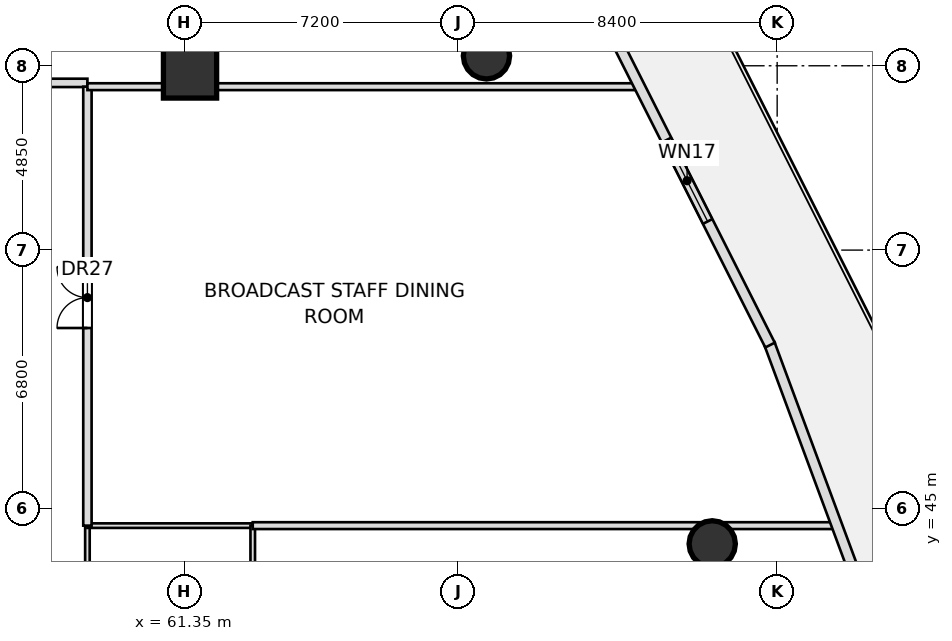
"""IFC4 building model, lengths in metres.
Left out: names, types, materials, properties, quantities, classifications, styles, units other than length and angle.
Written with IfcOpenShell. Run it as: python <this file> out.ifc"""

import sys

from ifc_helpers import new_model, si_unit, direction, frame, frame_2d, origin, origin_2d, place, context, subcontext, project, spatial, rectangle, hollow_circle, extrude, element, fill, save


model = new_model("IFC4")
c1 = context("Model", 3, precision=1e-05, world=origin(), true_north=direction((0.0, 1.0)))
c2 = subcontext(c1, "Body", "Model", "MODEL_VIEW")
j1 = project(units=[si_unit("LENGTHUNIT", "METRE"), si_unit("PLANEANGLEUNIT", "RADIAN")], contexts=[c1])
p1 = place(None, origin())
s1 = spatial("IfcSite", under=j1, at=p1, CompositionType="ELEMENT")
p2 = place(p1, origin())
s2 = spatial("IfcBuilding", under=s1, at=p2, CompositionType="ELEMENT")
p3 = place(p2, frame((0.0, 0.0, 16.8)))
s3 = spatial("IfcBuildingStorey", under=s2, at=p3, CompositionType="ELEMENT", Elevation=16.8)
p4 = place(p3, frame((61.5, 56.5, 0.0), z_axis=(0.0, 0.0, 1.0), x_axis=(1.0, 0.0, 0.0)))
e1 = element("IfcColumn", 1, at=p4, inside=s3, PredefinedType="COLUMN", context=c2, shape_type="SweptSolid", body=[
    extrude(rectangle(XDim=1.4, YDim=1.4, at=origin_2d()), origin(), (0.0, 0.0, 1.0), 4.95),
])
for number, where, z_axis, x_axis in (
    (2, (75.241, 44.07, 0.0), (0.0, 0.0, 1.0), (1.0, 0.0, 0.0)),
    (3, (69.301, 56.911, 0.0), (0.0, 0.0, 1.0), (1.0, 0.0, 0.0)),
):
    element("IfcColumn", number, at=place(p3, frame(where, z_axis=z_axis, x_axis=x_axis)), inside=s3, PredefinedType="COLUMN", context=c2, shape_type="SweptSolid", body=[
        extrude(hollow_circle(Radius=0.61, WallThickness=0.05, at=origin_2d()), origin(), (0.0, 0.0, 1.0), 4.95),
    ])
p5 = place(p3, frame((36.2, 56.2, 0.0), z_axis=(0.0, 0.0, 1.0), x_axis=(1.0, 0.0, 0.0)))
e4 = element("IfcWall", 4, at=p5, inside=s3, PredefinedType="PARTITIONING", context=c2, shape_type="SweptSolid", body=[
    extrude(rectangle(XDim=22.6, YDim=0.22, at=frame_2d((11.3, 0.0))), origin(), (0.0, 0.0, 1.0), 4.95),
])
p6 = place(p5, frame((6.5, 0.0, 0.0)))
e5 = element("IfcOpeningElement", 5, at=p6, cuts=e4, PredefinedType="OPENING", context=c2, shape_type="SweptSolid", body=[
    extrude(rectangle(XDim=1.6, YDim=2.3, at=frame_2d((0.8, 1.15))), frame((0.0, 0.12, 0.0), z_axis=(0.0, -1.0, 0.0), x_axis=(1.0, 0.0, 0.0)), (0.0, 0.0, 1.0), 0.24),
])
p7 = place(p3, frame((58.8, 38.25, 0.0), z_axis=(0.0, 0.0, 1.0), x_axis=(0.0, 1.0, 0.0)))
e6 = element("IfcWall", 6, at=p7, inside=s3, PredefinedType="PARTITIONING", context=c2, shape_type="SweptSolid", body=[
    extrude(rectangle(XDim=6.3, YDim=0.12, at=frame_2d((3.15, 0.0))), origin(), (0.0, 0.0, 1.0), 4.95),
])
p8 = place(p7, frame((0.8, 0.0, 0.0)))
e7 = element("IfcOpeningElement", 7, at=p8, cuts=e6, PredefinedType="OPENING", context=c2, shape_type="SweptSolid", body=[
    extrude(rectangle(XDim=0.9, YDim=2.05, at=frame_2d((0.45, 1.025))), frame((0.0, 0.07, 0.0), z_axis=(0.0, -1.0, 0.0), x_axis=(1.0, 0.0, 0.0)), (0.0, 0.0, 1.0), 0.14),
])
p9 = place(p7, frame((3.85, 0.0, 0.0)))
e8 = element("IfcOpeningElement", 8, at=p9, cuts=e6, PredefinedType="OPENING", context=c2, shape_type="SweptSolid", body=[
    extrude(rectangle(XDim=0.9, YDim=2.05, at=frame_2d((0.45, 1.025))), frame((0.0, 0.07, 0.0), z_axis=(0.0, -1.0, 0.0), x_axis=(1.0, 0.0, 0.0)), (0.0, 0.0, 1.0), 0.14),
])
p10 = place(p3, frame((58.8, 44.55, 0.0), z_axis=(0.0, 0.0, 1.0), x_axis=(1.0, 0.0, 0.0)))
e9 = element("IfcWall", 9, at=p10, inside=s3, PredefinedType="PARTITIONING", context=c2, shape_type="SweptSolid", body=[
    extrude(rectangle(XDim=4.35, YDim=0.12, at=frame_2d((2.175, 0.0))), origin(), (0.0, 0.0, 1.0), 4.95),
])
p11 = place(p3, frame((63.15, 38.25, 0.0), z_axis=(0.0, 0.0, 1.0), x_axis=(0.0, 1.0, 0.0)))
e10 = element("IfcWall", 10, at=p11, inside=s3, PredefinedType="PARTITIONING", context=c2, shape_type="SweptSolid", body=[
    extrude(rectangle(XDim=6.3, YDim=0.12, at=frame_2d((3.15, 0.0))), origin(), (0.0, 0.0, 1.0), 4.95),
])
p12 = place(p3, frame((58.8, 44.55, 0.0), z_axis=(0.0, 0.0, 1.0), x_axis=(0.0, 1.0, 0.0)))
e11 = element("IfcWall", 11, at=p12, inside=s3, PredefinedType="PARTITIONING", context=c2, shape_type="SweptSolid", body=[
    extrude(rectangle(XDim=11.55, YDim=0.22, at=frame_2d((5.775, 0.0))), origin(), (0.0, 0.0, 1.0), 4.025),
])
p13 = place(p12, frame((5.2, 0.0, 0.0)))
e12 = element("IfcOpeningElement", 12, at=p13, cuts=e11, PredefinedType="OPENING", context=c2, shape_type="SweptSolid", body=[
    extrude(rectangle(XDim=1.6, YDim=2.3, at=frame_2d((0.8, 1.15))), frame((0.0, 0.12, 0.0), z_axis=(0.0, -1.0, 0.0), x_axis=(1.0, 0.0, 0.0)), (0.0, 0.0, 1.0), 0.24),
])
p14 = place(p3, frame((58.8, 56.1, 0.0), z_axis=(0.0, 0.0, 1.0), x_axis=(1.0, 0.0, 0.0)))
e13 = element("IfcWall", 13, at=p14, inside=s3, PredefinedType="PARTITIONING", context=c2, shape_type="SweptSolid", body=[
    extrude(rectangle(XDim=14.485, YDim=0.18, at=frame_2d((7.243, 0.0))), origin(), (0.0, 0.0, 1.0), 4.125),
])
p15 = place(p3, frame((63.15, 44.55, 0.0), z_axis=(0.0, 0.0, 1.0), x_axis=(1.0, 0.0, 0.0)))
e14 = element("IfcWall", 14, at=p15, inside=s3, PredefinedType="PARTITIONING", context=c2, shape_type="SweptSolid", body=[
    extrude(rectangle(XDim=15.33, YDim=0.18, at=frame_2d((7.665, 0.0))), origin(), (0.0, 0.0, 1.0), 4.95),
])
p16 = place(p3, frame((80.119, 40.246, 0.0), z_axis=(0.0, 0.0, 1.0), x_axis=(-0.347784668118, 0.937574436843, 0.0)))
e15 = element("IfcWall", 15, at=p16, inside=s3, PredefinedType="STANDARD", context=c2, shape_type="SweptSolid", body=[
    extrude(rectangle(XDim=9.687, YDim=0.28, at=frame_2d((4.843, 0.0))), origin(), (0.0, 0.0, 1.0), 4.95),
])
p17 = place(p3, frame((76.762, 49.301, 0.0), z_axis=(0.0, 0.0, 1.0), x_axis=(-0.450627844178, 0.892711905405, 0.0)))
e16 = element("IfcWall", 16, at=p17, inside=s3, PredefinedType="STANDARD", context=c2, shape_type="SweptSolid", body=[
    extrude(rectangle(XDim=9.687, YDim=0.28, at=frame_2d((4.844, 0.0))), origin(), (0.0, 0.0, 1.0), 4.95),
])
p18 = place(p17, frame((3.643, 0.0, 1.0)))
e17 = element("IfcOpeningElement", 17, at=p18, cuts=e16, PredefinedType="OPENING", context=c2, shape_type="SweptSolid", body=[
    extrude(rectangle(XDim=2.4, YDim=1.5, at=frame_2d((1.2, 0.75))), frame((0.0, 0.15, 0.0), z_axis=(0.0, -1.0, 0.0), x_axis=(1.0, 0.0, 0.0)), (0.0, 0.0, 1.0), 0.3),
])
p19 = place(p13, origin())
e18 = element("IfcDoor", 18, at=p19, inside=s3, OperationType="DOUBLE_DOOR_SINGLE_SWING", PredefinedType="DOOR", context=c2, shape_type="SweptSolid", body=[
    extrude(rectangle(XDim=1.6, YDim=2.3, at=frame_2d((0.8, 1.15))), frame((0.0, 0.025, 0.0), z_axis=(0.0, -1.0, 0.0), x_axis=(1.0, 0.0, 0.0)), (0.0, 0.0, 1.0), 0.05),
])
fill(e12, e18)
p20 = place(p18, origin())
e19 = element("IfcWindow", 19, at=p20, inside=s3, PartitioningType="SINGLE_PANEL", PredefinedType="WINDOW", context=c2, shape_type="SweptSolid", body=[
    extrude(rectangle(XDim=2.4, YDim=1.5, at=frame_2d((1.2, 0.75))), frame((0.0, 0.03, 0.0), z_axis=(0.0, -1.0, 0.0), x_axis=(1.0, 0.0, 0.0)), (0.0, 0.0, 1.0), 0.06),
])
fill(e17, e19)
save(model, sys.argv[1])
